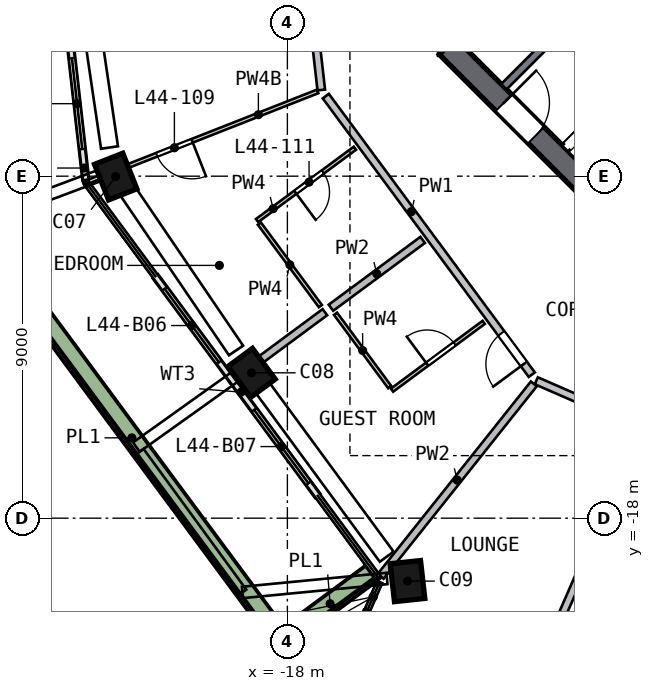
"""IFC4 building model, lengths in metres.
Left out: names, types, materials, properties, quantities, classifications, styles, units other than length and angle.
Written with IfcOpenShell. Run it as: python <this file> out.ifc"""

import sys

from ifc_helpers import new_model, si_unit, direction, frame, frame_2d, origin, origin_2d, place, context, subcontext, project, spatial, rectangle, extrude, element, fill, save


model = new_model("IFC4")
c1 = context("Model", 3, precision=1e-05, world=origin(), true_north=direction((0.0, 1.0)))
c2 = subcontext(c1, "Body", "Model", "MODEL_VIEW")
j1 = project(units=[si_unit("LENGTHUNIT", "METRE"), si_unit("PLANEANGLEUNIT", "RADIAN")], contexts=[c1])
p1 = place(None, origin())
s1 = spatial("IfcSite", under=j1, at=p1, CompositionType="ELEMENT")
p2 = place(p1, origin())
s2 = spatial("IfcBuilding", under=s1, at=p2, CompositionType="ELEMENT")
p3 = place(p2, frame((0.0, 0.0, 183.5)))
s3 = spatial("IfcBuildingStorey", under=s2, at=p3, CompositionType="ELEMENT", Elevation=183.5)
p4 = place(p3, frame((-22.57, -8.882, 0.0), z_axis=(0.043181416, -0.106965234, 0.993324622), x_axis=(-0.364010929, 0.924224428, 0.115348383)))
e1 = element("IfcColumn", 1, at=p4, inside=s3, PredefinedType="COLUMN", context=c2, shape_type="SweptSolid", body=[
    extrude(rectangle(XDim=1.0, YDim=0.8, at=origin_2d()), origin(), (0.0, 0.0, 1.0), 3.211),
])
p5 = place(p3, frame((-19.023, -14.066, 0.0), z_axis=(0.067607436, -0.089889752, 0.9936544), x_axis=(0.590507389, -0.799156424, -0.112472368)))
e2 = element("IfcColumn", 2, at=p5, inside=s3, PredefinedType="COLUMN", context=c2, shape_type="SweptSolid", body=[
    extrude(rectangle(XDim=1.0, YDim=0.8, at=origin_2d()), origin(), (0.0, 0.0, 1.0), 3.21),
])
p6 = place(p3, frame((-14.952, -19.571, 0.0), z_axis=(0.093641841, -0.070307389, 0.993120374), x_axis=(-0.10567885, 0.991166279, 0.080133564)))
e3 = element("IfcColumn", 3, at=p6, inside=s3, PredefinedType="COLUMN", context=c2, shape_type="SweptSolid", body=[
    extrude(rectangle(XDim=1.0, YDim=0.8, at=origin_2d()), origin(), (0.0, 0.0, 1.0), 3.212),
])
p7 = place(p3, frame((-13.7, 5.799, 0.0), z_axis=(0.0, 0.0, 1.0), x_axis=(0.0, -1.0, 0.0)))
e4 = element("IfcWall", 4, at=p7, inside=s3, PredefinedType="SHEAR", context=c2, shape_type="SweptSolid", body=[
    extrude(rectangle(XDim=11.598, YDim=0.6, at=frame_2d((5.799, 0.0))), origin(), (0.0, 0.0, 1.0), 3.5),
])
p8 = place(p7, frame((4.899, 0.0, 0.0)))
e5 = element("IfcOpeningElement", 5, at=p8, cuts=e4, PredefinedType="OPENING", context=c2, shape_type="SweptSolid", body=[
    extrude(rectangle(XDim=1.8, YDim=2.1, at=frame_2d((0.9, 1.05))), frame((0.0, 0.31, 0.0), z_axis=(0.0, -1.0, 0.0), x_axis=(1.0, 0.0, 0.0)), (0.0, 0.0, 1.0), 0.62),
])
p9 = place(p3, frame((-13.788, -5.587, 0.0), z_axis=(0.0, 0.0, 1.0), x_axis=(0.707106781, -0.707106781, 0.0)))
e6 = element("IfcWall", 6, at=p9, inside=s3, PredefinedType="SHEAR", context=c2, shape_type="SweptSolid", body=[
    extrude(rectangle(XDim=11.598, YDim=0.6, at=frame_2d((5.799, 0.0))), origin(), (0.0, 0.0, 1.0), 3.5),
])
p10 = place(p9, frame((2.099, 0.0, 0.0)))
e7 = element("IfcOpeningElement", 7, at=p10, cuts=e6, PredefinedType="OPENING", context=c2, shape_type="SweptSolid", body=[
    extrude(rectangle(XDim=1.2, YDim=2.1, at=frame_2d((0.6, 1.05))), frame((0.0, 0.31, 0.0), z_axis=(0.0, -1.0, 0.0), x_axis=(1.0, 0.0, 0.0)), (0.0, 0.0, 1.0), 0.62),
])
p11 = place(p3, frame((-16.01, -20.497, 0.0), z_axis=(0.0, 0.0, 1.0), x_axis=(0.916914732, -0.399083166, 0.0)))
e8 = element("IfcWall", 8, at=p11, inside=s3, PredefinedType="SOLIDWALL", context=c2, shape_type="SweptSolid", body=[
    extrude(rectangle(XDim=1.875, YDim=0.15, at=frame_2d((0.938, 0.0))), origin(), (0.0, 0.0, 1.0), 3.19),
])
p12 = place(p3, frame((-23.714, -5.502, 0.0), z_axis=(0.0, 0.0, 1.0), x_axis=(0.112844416, -0.99361267, 0.0)))
e9 = element("IfcWall", 9, at=p12, inside=s3, PredefinedType="SOLIDWALL", context=c2, shape_type="SweptSolid", body=[
    extrude(rectangle(XDim=3.609, YDim=0.15, at=frame_2d((1.804, 0.0))), origin(), (0.0, 0.0, 1.0), 2.475),
])
p13 = place(p12, frame((0.4, 0.0, 0.0)))
e10 = element("IfcOpeningElement", 10, at=p13, cuts=e9, PredefinedType="OPENING", context=c2, shape_type="SweptSolid", body=[
    extrude(rectangle(XDim=2.4, YDim=2.4, at=frame_2d((1.2, 1.2))), frame((0.0, 0.085, 0.0), z_axis=(0.0, -1.0, 0.0), x_axis=(1.0, 0.0, 0.0)), (0.0, 0.0, 1.0), 0.17),
])
p14 = place(p3, frame((-21.466, -11.644, 0.0), z_axis=(0.0, 0.0, 1.0), x_axis=(0.594528355, -0.804074645, 0.0)))
e11 = element("IfcWall", 11, at=p14, inside=s3, PredefinedType="SOLIDWALL", context=c2, shape_type="SweptSolid", body=[
    extrude(rectangle(XDim=3.4, YDim=0.15, at=frame_2d((1.7, 0.0))), origin(), (0.0, 0.0, 1.0), 2.475),
])
p15 = place(p14, frame((0.4, 0.0, 0.0)))
e12 = element("IfcOpeningElement", 12, at=p15, cuts=e11, PredefinedType="OPENING", context=c2, shape_type="SweptSolid", body=[
    extrude(rectangle(XDim=2.4, YDim=2.4, at=frame_2d((1.2, 1.2))), frame((0.0, 0.085, 0.0), z_axis=(0.0, -1.0, 0.0), x_axis=(1.0, 0.0, 0.0)), (0.0, 0.0, 1.0), 0.17),
])
p16 = place(p3, frame((-19.445, -14.378, 0.0), z_axis=(0.0, 0.0, 1.0), x_axis=(0.59454435, -0.804062818, 0.0)))
e13 = element("IfcWall", 13, at=p16, inside=s3, PredefinedType="SOLIDWALL", context=c2, shape_type="SweptSolid", body=[
    extrude(rectangle(XDim=3.761, YDim=0.15, at=frame_2d((1.881, 0.0))), origin(), (0.0, 0.0, 1.0), 2.475),
])
p17 = place(p16, frame((0.961, 0.0, 0.0)))
e14 = element("IfcOpeningElement", 14, at=p17, cuts=e13, PredefinedType="OPENING", context=c2, shape_type="SweptSolid", body=[
    extrude(rectangle(XDim=2.4, YDim=2.4, at=frame_2d((1.2, 1.2))), frame((0.0, 0.085, 0.0), z_axis=(0.0, -1.0, 0.0), x_axis=(1.0, 0.0, 0.0)), (0.0, 0.0, 1.0), 0.17),
])
p18 = place(p3, frame((-26.172, -10.368, 0.0), z_axis=(0.0, 0.0, 1.0), x_axis=(0.594546616, -0.804061143, 0.0)))
e15 = element("IfcWall", 15, at=p18, inside=s3, PredefinedType="SOLIDWALL", context=c2, shape_type="SweptSolid", body=[
    extrude(rectangle(XDim=13.723, YDim=0.5, at=frame_2d((6.862, 0.0))), origin(), (0.0, 0.0, 1.0), 0.7),
])
p19 = place(p3, frame((-17.96, -21.053, 0.0), z_axis=(0.0, 0.0, 1.0), x_axis=(0.804052053, 0.594558909, 0.0)))
e16 = element("IfcWall", 16, at=p19, inside=s3, PredefinedType="SOLIDWALL", context=c2, shape_type="SweptSolid", body=[
    extrude(rectangle(XDim=2.699, YDim=0.5, at=frame_2d((1.35, 0.0))), origin(), (0.0, 0.0, 1.0), 0.7),
])
p20 = place(p3, frame((-9.334, -3.677, 0.0), z_axis=(0.0, 0.0, 1.0), x_axis=(-0.707135845, -0.707077716, 0.0)))
e17 = element("IfcWall", 17, at=p20, inside=s3, PredefinedType="SOLIDWALL", context=c2, shape_type="SweptSolid", body=[
    extrude(rectangle(XDim=4.2, YDim=0.2, at=frame_2d((2.1, 0.0))), origin(), (0.0, 0.0, 1.0), 3.19),
])
p21 = place(p3, frame((-17.108, -6.732, 0.0), z_axis=(0.0, 0.0, 1.0), x_axis=(-0.112835605, 0.993613671, 0.0)))
e18 = element("IfcWall", 18, at=p21, inside=s3, PredefinedType="SOLIDWALL", context=c2, shape_type="SweptSolid", body=[
    extrude(rectangle(XDim=9.317, YDim=0.2, at=frame_2d((4.658, 0.0))), origin(), (0.0, 0.0, 1.0), 3.19),
])
p22 = place(p21, frame((1.9, 0.0, 0.0)))
e19 = element("IfcOpeningElement", 19, at=p22, cuts=e18, PredefinedType="OPENING", context=c2, shape_type="SweptSolid", body=[
    extrude(rectangle(XDim=1.0, YDim=2.1, at=frame_2d((0.5, 1.05))), frame((0.0, 0.11, 0.0), z_axis=(0.0, -1.0, 0.0), x_axis=(1.0, 0.0, 0.0)), (0.0, 0.0, 1.0), 0.22),
])
p23 = place(p3, frame((-11.569, -14.223, 0.0), z_axis=(0.0, 0.0, 1.0), x_axis=(-0.594544652, 0.804062595, 0.0)))
e20 = element("IfcWall", 20, at=p23, inside=s3, PredefinedType="SOLIDWALL", context=c2, shape_type="SweptSolid", body=[
    extrude(rectangle(XDim=9.117, YDim=0.2, at=frame_2d((4.559, 0.0))), origin(), (0.0, 0.0, 1.0), 3.19),
])
p24 = place(p23, frame((0.35, 0.0, 0.0)))
e21 = element("IfcOpeningElement", 21, at=p24, cuts=e20, PredefinedType="OPENING", context=c2, shape_type="SweptSolid", body=[
    extrude(rectangle(XDim=1.0, YDim=2.1, at=frame_2d((0.5, 1.05))), frame((0.0, 0.11, 0.0), z_axis=(0.0, -1.0, 0.0), x_axis=(1.0, 0.0, 0.0)), (0.0, 0.0, 1.0), 0.22),
])
p25 = place(p3, frame((-2.724, -18.182, 0.0), z_axis=(0.0, 0.0, 1.0), x_axis=(-0.916915816, 0.399080676, 0.0)))
e22 = element("IfcWall", 22, at=p25, inside=s3, PredefinedType="SOLIDWALL", context=c2, shape_type="SweptSolid", body=[
    extrude(rectangle(XDim=9.517, YDim=0.2, at=frame_2d((4.758, 0.0))), origin(), (0.0, 0.0, 1.0), 3.19),
])
p26 = place(p25, frame((3.869, 0.0, 0.0)))
e23 = element("IfcOpeningElement", 23, at=p26, cuts=e22, PredefinedType="OPENING", context=c2, shape_type="SweptSolid", body=[
    extrude(rectangle(XDim=1.8, YDim=2.1, at=frame_2d((0.9, 1.05))), frame((0.0, 0.11, 0.0), z_axis=(0.0, -1.0, 0.0), x_axis=(1.0, 0.0, 0.0)), (0.0, 0.0, 1.0), 0.22),
])
p27 = place(p3, frame((-17.013, -12.58, 0.0), z_axis=(0.0, 0.0, 1.0), x_axis=(-0.804072935, -0.594530668, 0.0)))
e24 = element("IfcWall", 24, at=p27, inside=s3, PredefinedType="SOLIDWALL", context=c2, shape_type="SweptSolid", body=[
    extrude(rectangle(XDim=2.95, YDim=0.2, at=frame_2d((1.475, 0.0))), origin(), (0.0, 0.0, 1.0), 3.19),
])
p28 = place(p3, frame((-14.44, -10.677, 0.0), z_axis=(0.0, 0.0, 1.0), x_axis=(-0.804051056, -0.594560258, 0.0)))
e25 = element("IfcWall", 25, at=p28, inside=s3, PredefinedType="SOLIDWALL", context=c2, shape_type="SweptSolid", body=[
    extrude(rectangle(XDim=3.002, YDim=0.2, at=frame_2d((1.501, 0.0))), origin(), (0.0, 0.0, 1.0), 3.19),
])
p29 = place(p3, frame((-15.547, -19.532, 0.0), z_axis=(0.0, 0.0, 1.0), x_axis=(0.622775952, 0.782400226, 0.0)))
e26 = element("IfcWall", 26, at=p29, inside=s3, PredefinedType="SOLIDWALL", context=c2, shape_type="SweptSolid", body=[
    extrude(rectangle(XDim=6.476, YDim=0.2, at=frame_2d((3.238, 0.0))), origin(), (0.0, 0.0, 1.0), 3.19),
])
p30 = place(p3, frame((-12.993, -25.655, 0.0), z_axis=(0.0, 0.0, 1.0), x_axis=(0.399071545, 0.91691979, 0.0)))
e27 = element("IfcWall", 27, at=p30, inside=s3, PredefinedType="SOLIDWALL", context=c2, shape_type="SweptSolid", body=[
    extrude(rectangle(XDim=10.75, YDim=0.2, at=frame_2d((5.375, 0.0))), origin(), (0.0, 0.0, 1.0), 2.69),
])
p31 = place(p30, frame((1.95, 0.0, 0.0)))
e28 = element("IfcOpeningElement", 28, at=p31, cuts=e27, PredefinedType="OPENING", context=c2, shape_type="SweptSolid", body=[
    extrude(rectangle(XDim=1.0, YDim=2.1, at=frame_2d((0.5, 1.05))), frame((0.0, 0.11, 0.0), z_axis=(0.0, -1.0, 0.0), x_axis=(1.0, 0.0, 0.0)), (0.0, 0.0, 1.0), 0.22),
])
p32 = place(p3, frame((-17.204, -6.77, 0.0), z_axis=(0.0, 0.0, 1.0), x_axis=(-0.930544683, -0.366178362, 0.0)))
e29 = element("IfcWall", 29, at=p32, inside=s3, PredefinedType="PARTITIONING", context=c2, shape_type="SweptSolid", body=[
    extrude(rectangle(XDim=6.476, YDim=0.1, at=frame_2d((3.238, 0.0))), origin(), (0.0, 0.0, 1.0), 2.69),
])
p33 = place(p32, frame((3.55, 0.0, 0.0)))
e30 = element("IfcOpeningElement", 30, at=p33, cuts=e29, PredefinedType="OPENING", context=c2, shape_type="SweptSolid", body=[
    extrude(rectangle(XDim=1.0, YDim=2.1, at=frame_2d((0.5, 1.05))), frame((0.0, 0.06, 0.0), z_axis=(0.0, -1.0, 0.0), x_axis=(1.0, 0.0, 0.0)), (0.0, 0.0, 1.0), 0.12),
])
p34 = place(p3, frame((-18.737, -10.248, 0.0), z_axis=(0.0, 0.0, 1.0), x_axis=(0.594546144, -0.804061492, 0.0)))
e31 = element("IfcWall", 31, at=p34, inside=s3, PredefinedType="PARTITIONING", context=c2, shape_type="SweptSolid", body=[
    extrude(rectangle(XDim=2.7, YDim=0.1, at=frame_2d((1.35, 0.0))), origin(), (0.0, 0.0, 1.0), 3.19),
])
p35 = place(p3, frame((-16.223, -8.265, 0.0), z_axis=(0.0, 0.0, 1.0), x_axis=(-0.804092095, -0.594504754, 0.0)))
e32 = element("IfcWall", 32, at=p35, inside=s3, PredefinedType="PARTITIONING", context=c2, shape_type="SweptSolid", body=[
    extrude(rectangle(XDim=3.2, YDim=0.1, at=frame_2d((1.6, 0.0))), origin(), (0.0, 0.0, 1.0), 3.19),
])
p36 = place(p35, frame((1.05, 0.0, 0.0)))
e33 = element("IfcOpeningElement", 33, at=p36, cuts=e32, PredefinedType="OPENING", context=c2, shape_type="SweptSolid", body=[
    extrude(rectangle(XDim=0.9, YDim=2.1, at=frame_2d((0.45, 1.05))), frame((0.0, 0.06, 0.0), z_axis=(0.0, -1.0, 0.0), x_axis=(1.0, 0.0, 0.0)), (0.0, 0.0, 1.0), 0.12),
])
p37 = place(p3, frame((-15.306, -14.551, 0.0), z_axis=(0.0, 0.0, 1.0), x_axis=(-0.594534052, 0.804070433, 0.0)))
e34 = element("IfcWall", 34, at=p37, inside=s3, PredefinedType="PARTITIONING", context=c2, shape_type="SweptSolid", body=[
    extrude(rectangle(XDim=2.4, YDim=0.1, at=frame_2d((1.2, 0.0))), origin(), (0.0, 0.0, 1.0), 3.19),
])
p38 = place(p3, frame((-15.247, -14.632, 0.0), z_axis=(0.0, 0.0, 1.0), x_axis=(0.804044201, 0.594569527, 0.0)))
e35 = element("IfcWall", 35, at=p38, inside=s3, PredefinedType="PARTITIONING", context=c2, shape_type="SweptSolid", body=[
    extrude(rectangle(XDim=3.0, YDim=0.1, at=frame_2d((1.5, 0.0))), origin(), (0.0, 0.0, 1.0), 3.19),
])
p39 = place(p38, frame((1.15, 0.0, 0.0)))
e36 = element("IfcOpeningElement", 36, at=p39, cuts=e35, PredefinedType="OPENING", context=c2, shape_type="SweptSolid", body=[
    extrude(rectangle(XDim=0.9, YDim=2.1, at=frame_2d((0.45, 1.05))), frame((0.0, 0.06, 0.0), z_axis=(0.0, -1.0, 0.0), x_axis=(1.0, 0.0, 0.0)), (0.0, 0.0, 1.0), 0.12),
])
p40 = place(p13, origin())
e37 = element("IfcDoor", 37, at=p40, inside=s3, OperationType="SLIDING_TO_RIGHT", PredefinedType="DOOR", context=c2, shape_type="SweptSolid", body=[
    extrude(rectangle(XDim=2.4, YDim=2.4, at=frame_2d((1.2, 1.2))), frame((0.0, 0.025, 0.0), z_axis=(0.0, -1.0, 0.0), x_axis=(1.0, 0.0, 0.0)), (0.0, 0.0, 1.0), 0.05),
])
fill(e10, e37)
p41 = place(p15, origin())
e38 = element("IfcDoor", 38, at=p41, inside=s3, OperationType="SLIDING_TO_RIGHT", PredefinedType="DOOR", context=c2, shape_type="SweptSolid", body=[
    extrude(rectangle(XDim=2.4, YDim=2.4, at=frame_2d((1.2, 1.2))), frame((0.0, 0.025, 0.0), z_axis=(0.0, -1.0, 0.0), x_axis=(1.0, 0.0, 0.0)), (0.0, 0.0, 1.0), 0.05),
])
fill(e12, e38)
p42 = place(p17, origin())
e39 = element("IfcDoor", 39, at=p42, inside=s3, OperationType="SLIDING_TO_LEFT", PredefinedType="DOOR", context=c2, shape_type="SweptSolid", body=[
    extrude(rectangle(XDim=2.4, YDim=2.4, at=frame_2d((1.2, 1.2))), frame((0.0, 0.025, 0.0), z_axis=(0.0, -1.0, 0.0), x_axis=(1.0, 0.0, 0.0)), (0.0, 0.0, 1.0), 0.05),
])
fill(e14, e39)
p43 = place(p10, origin())
e40 = element("IfcDoor", 40, at=p43, inside=s3, OperationType="SINGLE_SWING_LEFT", PredefinedType="DOOR", context=c2, shape_type="SweptSolid", body=[
    extrude(rectangle(XDim=1.2, YDim=2.1, at=frame_2d((0.6, 1.05))), frame((0.0, 0.025, 0.0), z_axis=(0.0, -1.0, 0.0), x_axis=(1.0, 0.0, 0.0)), (0.0, 0.0, 1.0), 0.05),
])
fill(e7, e40)
p44 = place(p33, origin())
e41 = element("IfcDoor", 41, at=p44, inside=s3, OperationType="SINGLE_SWING_LEFT", PredefinedType="DOOR", context=c2, shape_type="SweptSolid", body=[
    extrude(rectangle(XDim=1.0, YDim=2.1, at=frame_2d((0.5, 1.05))), frame((0.0, 0.025, 0.0), z_axis=(0.0, -1.0, 0.0), x_axis=(1.0, 0.0, 0.0)), (0.0, 0.0, 1.0), 0.05),
])
fill(e30, e41)
p45 = place(p36, origin())
e42 = element("IfcDoor", 42, at=p45, inside=s3, OperationType="SINGLE_SWING_RIGHT", PredefinedType="DOOR", context=c2, shape_type="SweptSolid", body=[
    extrude(rectangle(XDim=0.9, YDim=2.1, at=frame_2d((0.45, 1.05))), frame((0.0, 0.025, 0.0), z_axis=(0.0, -1.0, 0.0), x_axis=(1.0, 0.0, 0.0)), (0.0, 0.0, 1.0), 0.05),
])
fill(e33, e42)
p46 = place(p24, origin())
e43 = element("IfcDoor", 43, at=p46, inside=s3, OperationType="SINGLE_SWING_LEFT", PredefinedType="DOOR", context=c2, shape_type="SweptSolid", body=[
    extrude(rectangle(XDim=1.0, YDim=2.1, at=frame_2d((0.5, 1.05))), frame((0.0, 0.025, 0.0), z_axis=(0.0, -1.0, 0.0), x_axis=(1.0, 0.0, 0.0)), (0.0, 0.0, 1.0), 0.05),
])
fill(e21, e43)
p47 = place(p39, origin())
e44 = element("IfcDoor", 44, at=p47, inside=s3, OperationType="SINGLE_SWING_LEFT", PredefinedType="DOOR", context=c2, shape_type="SweptSolid", body=[
    extrude(rectangle(XDim=0.9, YDim=2.1, at=frame_2d((0.45, 1.05))), frame((0.0, 0.025, 0.0), z_axis=(0.0, -1.0, 0.0), x_axis=(1.0, 0.0, 0.0)), (0.0, 0.0, 1.0), 0.05),
])
fill(e36, e44)
save(model, sys.argv[1])
